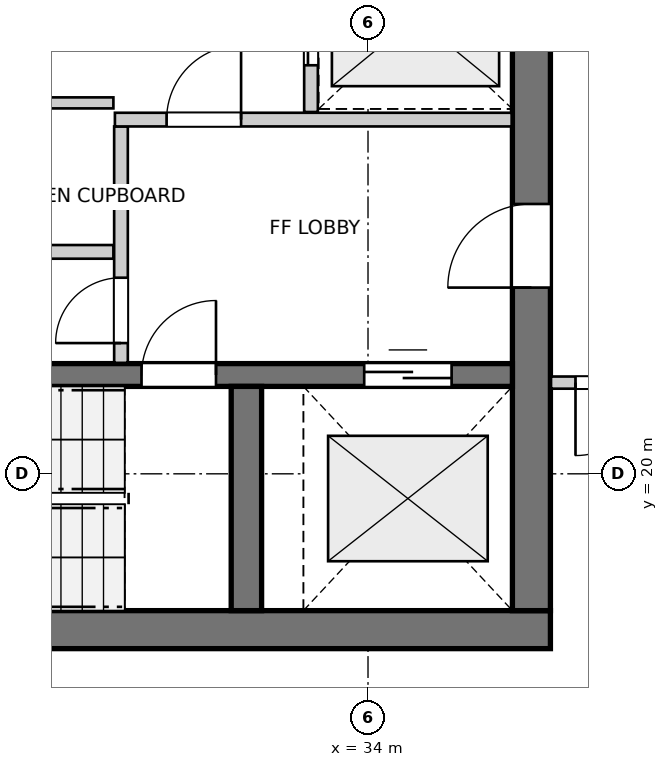
"""IFC4 building model, lengths in metres.
Left out: names, types, materials, properties, quantities, classifications, styles, units other than length and angle.
Written with IfcOpenShell. Run it as: python <this file> out.ifc"""

import sys

from ifc_helpers import new_model, si_unit, direction, frame, frame_2d, origin, place, context, subcontext, project, spatial, rectangle, extrude, source, transform, mapped, element, fill, save


model = new_model("IFC4")
c1 = context("Model", 3, precision=1e-05, world=origin(), true_north=direction((0.0, 1.0)))
c2 = subcontext(c1, "Body", "Model", "MODEL_VIEW")
j1 = project(units=[si_unit("LENGTHUNIT", "METRE"), si_unit("PLANEANGLEUNIT", "RADIAN")], contexts=[c1])
p1 = place(None, origin())
s1 = spatial("IfcSite", under=j1, at=p1, CompositionType="ELEMENT")
p2 = place(p1, origin())
s2 = spatial("IfcBuilding", under=s1, at=p2, CompositionType="ELEMENT")
p3 = place(p2, frame((0.0, 0.0, 246.8)))
s3 = spatial("IfcBuildingStorey", under=s2, at=p3, CompositionType="ELEMENT", Elevation=246.8)
p4 = place(p3, frame((24.3, 17.95, 0.0), z_axis=(0.0, 0.0, 1.0), x_axis=(1.0, 0.0, 0.0)))
e1 = element("IfcWall", 1, at=p4, inside=s3, PredefinedType="SHEAR", context=c2, shape_type="SweptSolid", body=[
    extrude(rectangle(XDim=12.1, YDim=0.5, at=frame_2d((6.05, 0.0))), origin(), (0.0, 0.0, 1.0), 2.96),
])
p5 = place(p3, frame((36.15, 18.2, 0.0), z_axis=(0.0, 0.0, 1.0), x_axis=(0.0, 1.0, 0.0)))
e2 = element("IfcWall", 2, at=p5, inside=s3, PredefinedType="SHEAR", context=c2, shape_type="SweptSolid", body=[
    extrude(rectangle(XDim=15.6, YDim=0.5, at=frame_2d((7.8, 0.0))), origin(), (0.0, 0.0, 1.0), 2.96),
])
p6 = place(p5, frame((4.25, 0.0, 0.0)))
e3 = element("IfcOpeningElement", 3, at=p6, cuts=e2, PredefinedType="OPENING", context=c2, shape_type="SweptSolid", body=[
    extrude(rectangle(XDim=1.1, YDim=2.15, at=frame_2d((0.55, 1.075))), frame((0.0, 0.26, 0.0), z_axis=(0.0, -1.0, 0.0), x_axis=(1.0, 0.0, 0.0)), (0.0, 0.0, 1.0), 0.52),
])
p7 = place(p5, frame((10.25, 0.0, 0.0)))
e4 = element("IfcOpeningElement", 4, at=p7, cuts=e2, PredefinedType="OPENING", context=c2, shape_type="SweptSolid", body=[
    extrude(rectangle(XDim=1.1, YDim=2.15, at=frame_2d((0.55, 1.075))), frame((0.0, 0.26, 0.0), z_axis=(0.0, -1.0, 0.0), x_axis=(1.0, 0.0, 0.0)), (0.0, 0.0, 1.0), 0.52),
])
p8 = place(p3, frame((24.8, 21.3, 0.0), z_axis=(0.0, 0.0, 1.0), x_axis=(1.0, 0.0, 0.0)))
e5 = element("IfcWall", 5, at=p8, inside=s3, PredefinedType="SHEAR", context=c2, shape_type="SweptSolid", body=[
    extrude(rectangle(XDim=11.1, YDim=0.3, at=frame_2d((5.55, 0.0))), origin(), (0.0, 0.0, 1.0), 2.96),
])
p9 = place(p8, frame((6.22, 0.0, 0.0)))
e6 = element("IfcOpeningElement", 6, at=p9, cuts=e5, PredefinedType="OPENING", context=c2, shape_type="SweptSolid", body=[
    extrude(rectangle(XDim=0.98, YDim=2.15, at=frame_2d((0.49, 1.075))), frame((0.0, 0.16, 0.0), z_axis=(0.0, -1.0, 0.0), x_axis=(1.0, 0.0, 0.0)), (0.0, 0.0, 1.0), 0.32),
])
p10 = place(p8, frame((9.15, 0.0, 0.0)))
e7 = element("IfcOpeningElement", 7, at=p10, cuts=e5, PredefinedType="OPENING", context=c2, shape_type="SweptSolid", body=[
    extrude(rectangle(XDim=1.15, YDim=2.15, at=frame_2d((0.575, 1.075))), frame((0.0, 0.16, 0.0), z_axis=(0.0, -1.0, 0.0), x_axis=(1.0, 0.0, 0.0)), (0.0, 0.0, 1.0), 0.32),
])
p11 = place(p3, frame((32.4, 18.2, 0.0), z_axis=(0.0, 0.0, 1.0), x_axis=(0.0, 1.0, 0.0)))
e8 = element("IfcWall", 8, at=p11, inside=s3, PredefinedType="SHEAR", context=c2, shape_type="SweptSolid", body=[
    extrude(rectangle(XDim=2.95, YDim=0.4, at=frame_2d((1.475, 0.0))), origin(), (0.0, 0.0, 1.0), 2.96),
])
p12 = place(p3, frame((30.75, 21.46, 0.0), z_axis=(0.0, 0.0, 1.0), x_axis=(0.0, 1.0, 0.0)))
e9 = element("IfcWall", 9, at=p12, inside=s3, PredefinedType="PARTITIONING", context=c2, shape_type="SweptSolid", body=[
    extrude(rectangle(XDim=3.11, YDim=0.18, at=frame_2d((1.555, 0.0))), origin(), (0.0, 0.0, 1.0), 2.96),
])
p13 = place(p12, frame((0.26, 0.0, 0.0)))
e10 = element("IfcOpeningElement", 10, at=p13, cuts=e9, PredefinedType="OPENING", context=c2, shape_type="SweptSolid", body=[
    extrude(rectangle(XDim=0.86, YDim=2.05, at=frame_2d((0.43, 1.025))), frame((0.0, 0.1, 0.0), z_axis=(0.0, -1.0, 0.0), x_axis=(1.0, 0.0, 0.0)), (0.0, 0.0, 1.0), 0.2),
])
p14 = place(p3, frame((30.67, 24.66, 0.0), z_axis=(0.0, 0.0, 1.0), x_axis=(1.0, 0.0, 0.0)))
e11 = element("IfcWall", 11, at=p14, inside=s3, PredefinedType="PARTITIONING", context=c2, shape_type="SweptSolid", body=[
    extrude(rectangle(XDim=5.22, YDim=0.18, at=frame_2d((2.61, 0.0))), origin(), (0.0, 0.0, 1.0), 2.96),
])
p15 = place(p14, frame((0.68, 0.0, 0.0)))
e12 = element("IfcOpeningElement", 12, at=p15, cuts=e11, PredefinedType="OPENING", context=c2, shape_type="SweptSolid", body=[
    extrude(rectangle(XDim=0.98, YDim=2.15, at=frame_2d((0.49, 1.075))), frame((0.0, 0.1, 0.0), z_axis=(0.0, -1.0, 0.0), x_axis=(1.0, 0.0, 0.0)), (0.0, 0.0, 1.0), 0.2),
])
p16 = place(p3, frame((33.25, 24.76, 0.0), z_axis=(0.0, 0.0, 1.0), x_axis=(0.0, 1.0, 0.0)))
e13 = element("IfcWall", 13, at=p16, inside=s3, PredefinedType="PARTITIONING", context=c2, shape_type="SweptSolid", body=[
    extrude(rectangle(XDim=2.48, YDim=0.18, at=frame_2d((1.24, 0.0))), origin(), (0.0, 0.0, 1.0), 2.96),
])
p17 = place(p16, frame((0.615, 0.0, 0.0)))
e14 = element("IfcOpeningElement", 14, at=p17, cuts=e13, PredefinedType="OPENING", context=c2, shape_type="SweptSolid", body=[
    extrude(rectangle(XDim=1.25, YDim=2.15, at=frame_2d((0.625, 1.075))), frame((0.0, 0.1, 0.0), z_axis=(0.0, -1.0, 0.0), x_axis=(1.0, 0.0, 0.0)), (0.0, 0.0, 1.0), 0.2),
])
p18 = place(p3, frame((24.81, 22.92, 0.0), z_axis=(0.0, 0.0, 1.0), x_axis=(1.0, 0.0, 0.0)))
e15 = element("IfcWall", 15, at=p18, inside=s3, PredefinedType="PARTITIONING", context=c2, shape_type="SweptSolid", body=[
    extrude(rectangle(XDim=5.84, YDim=0.18, at=frame_2d((2.92, 0.0))), origin(), (0.0, 0.0, 1.0), 2.96),
])
p19 = place(p3, frame((28.13, 24.88, 0.0), z_axis=(0.0, 0.0, 1.0), x_axis=(1.0, 0.0, 0.0)))
e16 = element("IfcWall", 16, at=p19, inside=s3, PredefinedType="PARTITIONING", context=c2, shape_type="SweptSolid", body=[
    extrude(rectangle(XDim=2.52, YDim=0.145, at=frame_2d((1.26, 0.0))), origin(), (0.0, 0.0, 1.0), 2.96),
])
p20 = place(p19, frame((0.82, 0.0, 0.0)))
e17 = element("IfcOpeningElement", 17, at=p20, cuts=e16, PredefinedType="OPENING", context=c2, shape_type="SweptSolid", body=[
    extrude(rectangle(XDim=0.86, YDim=2.05, at=frame_2d((0.43, 1.025))), frame((0.0, 0.083, 0.0), z_axis=(0.0, -1.0, 0.0), x_axis=(1.0, 0.0, 0.0)), (0.0, 0.0, 1.0), 0.165),
])
p21 = place(p3, frame((38.02, 21.2, 0.0), z_axis=(0.0, 0.0, 1.0), x_axis=(-1.0, 0.0, 0.0)))
e18 = element("IfcWall", 18, at=p21, inside=s3, PredefinedType="PARTITIONING", context=c2, shape_type="SweptSolid", body=[
    extrude(rectangle(XDim=1.612, YDim=0.16, at=frame_2d((0.806, 0.0))), origin(), (0.0, 0.0, 1.0), 2.96),
])
p22 = place(p21, frame((0.33, 0.0, 0.0)))
e19 = element("IfcOpeningElement", 19, at=p22, cuts=e18, PredefinedType="OPENING", context=c2, shape_type="SweptSolid", body=[
    extrude(rectangle(XDim=0.96, YDim=2.1, at=frame_2d((0.48, 1.05))), frame((0.0, 0.09, 0.0), z_axis=(0.0, -1.0, 0.0), x_axis=(1.0, 0.0, 0.0)), (0.0, 0.0, 1.0), 0.18),
])
m1 = source(origin(), c2, "Body", "SweptSolid", [
    extrude(rectangle(XDim=0.98, YDim=2.15, at=frame_2d((0.49, 1.075))), frame((0.0, 0.025, 0.0), z_axis=(0.0, -1.0, 0.0), x_axis=(1.0, 0.0, 0.0)), (0.0, 0.0, 1.0), 0.05),
])
p23 = place(p9, origin())
e20 = element("IfcDoor", 20, at=p23, inside=s3, OperationType="SINGLE_SWING_RIGHT", PredefinedType="DOOR", context=c2, shape_type="MappedRepresentation", body=[
    mapped(m1, transform((0.0, 0.0, 0.0), x_axis=(1.0, 0.0, 0.0), y_axis=(0.0, 1.0, 0.0), z_axis=(0.0, 0.0, 1.0), scale=1.0)),
])
fill(e6, e20)
m2 = source(origin(), c2, "Body", "SweptSolid", [
    extrude(rectangle(XDim=1.15, YDim=2.15, at=frame_2d((0.575, 1.075))), frame((0.0, 0.025, 0.0), z_axis=(0.0, -1.0, 0.0), x_axis=(1.0, 0.0, 0.0)), (0.0, 0.0, 1.0), 0.05),
])
p24 = place(p10, origin())
e21 = element("IfcDoor", 21, at=p24, inside=s3, OperationType="DOUBLE_DOOR_SLIDING", PredefinedType="DOOR", context=c2, shape_type="MappedRepresentation", body=[
    mapped(m2, transform((0.0, 0.0, 0.0), x_axis=(1.0, 0.0, 0.0), y_axis=(0.0, 1.0, 0.0), z_axis=(0.0, 0.0, 1.0), scale=1.0)),
])
fill(e7, e21)
m3 = source(origin(), c2, "Body", "SweptSolid", [
    extrude(rectangle(XDim=1.1, YDim=2.15, at=frame_2d((0.55, 1.075))), frame((0.0, 0.025, 0.0), z_axis=(0.0, -1.0, 0.0), x_axis=(1.0, 0.0, 0.0)), (0.0, 0.0, 1.0), 0.05),
])
p25 = place(p6, origin())
e22 = element("IfcDoor", 22, at=p25, inside=s3, OperationType="SINGLE_SWING_LEFT", PredefinedType="DOOR", context=c2, shape_type="MappedRepresentation", body=[
    mapped(m3, transform((0.0, 0.0, 0.0), x_axis=(1.0, 0.0, 0.0), y_axis=(0.0, 1.0, 0.0), z_axis=(0.0, 0.0, 1.0), scale=1.0)),
])
fill(e3, e22)
m4 = source(origin(), c2, "Body", "SweptSolid", [
    extrude(rectangle(XDim=0.86, YDim=2.05, at=frame_2d((0.43, 1.025))), frame((0.0, 0.025, 0.0), z_axis=(0.0, -1.0, 0.0), x_axis=(1.0, 0.0, 0.0)), (0.0, 0.0, 1.0), 0.05),
])
p26 = place(p13, origin())
e23 = element("IfcDoor", 23, at=p26, inside=s3, OperationType="SINGLE_SWING_LEFT", PredefinedType="DOOR", context=c2, shape_type="MappedRepresentation", body=[
    mapped(m4, transform((0.0, 0.0, 0.0), x_axis=(1.0, 0.0, 0.0), y_axis=(0.0, 1.0, 0.0), z_axis=(0.0, 0.0, 1.0), scale=1.0)),
])
fill(e10, e23)
p27 = place(p15, origin())
e24 = element("IfcDoor", 24, at=p27, inside=s3, OperationType="SINGLE_SWING_RIGHT", PredefinedType="DOOR", context=c2, shape_type="MappedRepresentation", body=[
    mapped(m1, transform((0.0, 0.0, 0.0), x_axis=(1.0, 0.0, 0.0), y_axis=(0.0, 1.0, 0.0), z_axis=(0.0, 0.0, 1.0), scale=1.0)),
])
fill(e12, e24)
m5 = source(origin(), c2, "Body", "SweptSolid", [
    extrude(rectangle(XDim=1.25, YDim=2.15, at=frame_2d((0.625, 1.075))), frame((0.0, 0.025, 0.0), z_axis=(0.0, -1.0, 0.0), x_axis=(1.0, 0.0, 0.0)), (0.0, 0.0, 1.0), 0.05),
])
p28 = place(p17, origin())
e25 = element("IfcDoor", 25, at=p28, inside=s3, OperationType="DOUBLE_DOOR_SLIDING", PredefinedType="DOOR", context=c2, shape_type="MappedRepresentation", body=[
    mapped(m5, transform((0.0, 0.0, 0.0), x_axis=(1.0, 0.0, 0.0), y_axis=(0.0, 1.0, 0.0), z_axis=(0.0, 0.0, 1.0), scale=1.0)),
])
fill(e14, e25)
m6 = source(origin(), c2, "Body", "SweptSolid", [
    extrude(rectangle(XDim=0.96, YDim=2.1, at=frame_2d((0.48, 1.05))), frame((0.0, 0.025, 0.0), z_axis=(0.0, -1.0, 0.0), x_axis=(1.0, 0.0, 0.0)), (0.0, 0.0, 1.0), 0.05),
])
p29 = place(p22, origin())
e26 = element("IfcDoor", 26, at=p29, inside=s3, OperationType="SINGLE_SWING_RIGHT", PredefinedType="DOOR", context=c2, shape_type="MappedRepresentation", body=[
    mapped(m6, transform((0.0, 0.0, 0.0), x_axis=(1.0, 0.0, 0.0), y_axis=(0.0, 1.0, 0.0), z_axis=(0.0, 0.0, 1.0), scale=1.0)),
])
fill(e19, e26)
save(model, sys.argv[1])
